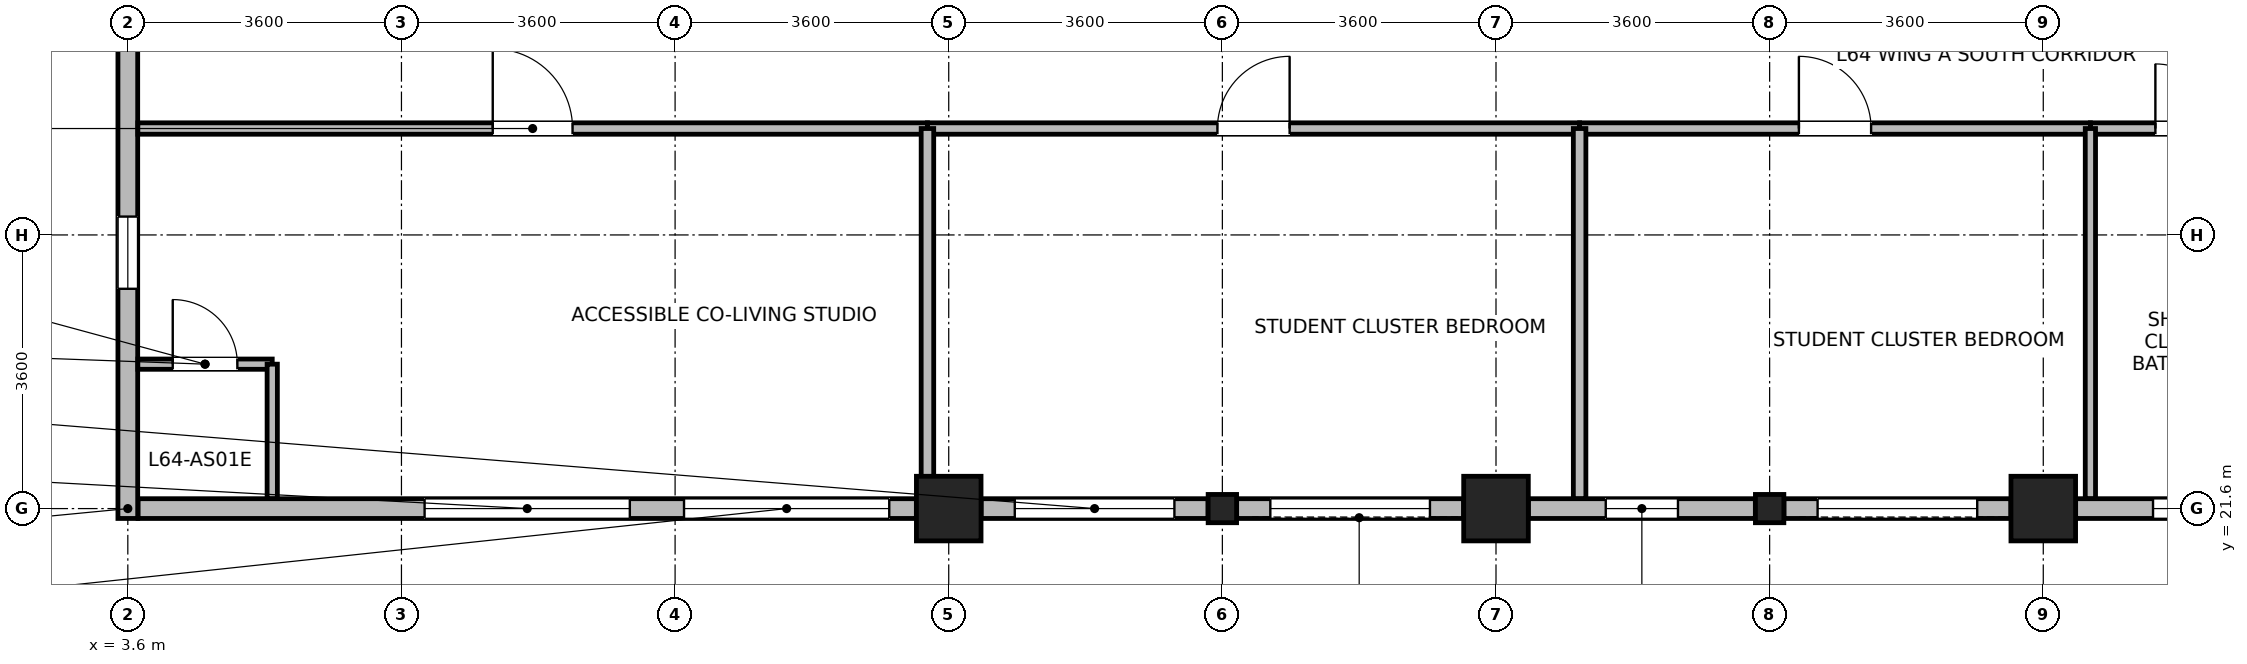
"""IFC4 building model, lengths in metres.
Left out: names, types, materials, properties, quantities, classifications, styles, units other than length and angle.
Written with IfcOpenShell. Run it as: python <this file> out.ifc"""

import sys

from ifc_helpers import new_model, si_unit, direction, frame, frame_2d, origin, origin_2d, place, context, subcontext, project, spatial, rectangle, i_section, extrude, source, transform, mapped, element, fill, save


model = new_model("IFC4")
c1 = context("Model", 3, precision=1e-05, world=origin(), true_north=direction((0.0, 1.0)))
c2 = subcontext(c1, "Body", "Model", "MODEL_VIEW")
j1 = project(units=[si_unit("LENGTHUNIT", "METRE"), si_unit("PLANEANGLEUNIT", "RADIAN")], contexts=[c1])
p1 = place(None, origin())
s1 = spatial("IfcSite", under=j1, at=p1, CompositionType="ELEMENT")
p2 = place(p1, origin())
s2 = spatial("IfcBuilding", under=s1, at=p2, CompositionType="ELEMENT")
p3 = place(p2, frame((0.0, 0.0, 249.9)))
s3 = spatial("IfcBuildingStorey", under=s2, at=p3, CompositionType="ELEMENT", Elevation=249.9)
m1 = source(origin(), c2, "Body", "SweptSolid", [
    extrude(rectangle(XDim=0.85, YDim=0.85, at=origin_2d()), origin(), (0.0, 0.0, 1.0), 3.7),
])
for number, where, z_axis, x_axis in (
    (1, (14.4, 21.6, 0.0), (0.0, 0.0, 1.0), (1.0, 0.0, 0.0)),
    (2, (21.6, 21.6, 0.0), (0.0, 0.0, 1.0), (1.0, 0.0, 0.0)),
    (3, (28.8, 21.6, 0.0), (0.0, 0.0, 1.0), (1.0, 0.0, 0.0)),
):
    element("IfcColumn", number, at=place(p3, frame(where, z_axis=z_axis, x_axis=x_axis)), inside=s3, PredefinedType="COLUMN", context=c2, shape_type="MappedRepresentation", body=[
        mapped(m1, transform((0.0, 0.0, 0.0), x_axis=(1.0, 0.0, 0.0), y_axis=(0.0, 1.0, 0.0), z_axis=(0.0, 0.0, 1.0), scale=1.0)),
    ])
m2 = source(origin(), c2, "Body", "SweptSolid", [
    extrude(i_section(OverallWidth=0.374, OverallDepth=0.372, WebThickness=0.015, FlangeThickness=0.026, FilletRadius=0.015, at=origin_2d()), origin(), (0.0, 0.0, 1.0), 3.7),
])
for number, where, z_axis, x_axis in (
    (4, (18.0, 21.6, 0.0), (0.0, 0.0, 1.0), (1.0, 0.0, 0.0)),
    (5, (25.2, 21.6, 0.0), (0.0, 0.0, 1.0), (1.0, 0.0, 0.0)),
):
    element("IfcColumn", number, at=place(p3, frame(where, z_axis=z_axis, x_axis=x_axis)), inside=s3, PredefinedType="COLUMN", context=c2, shape_type="MappedRepresentation", body=[
        mapped(m2, transform((0.0, 0.0, 0.0), x_axis=(1.0, 0.0, 0.0), y_axis=(0.0, 1.0, 0.0), z_axis=(0.0, 0.0, 1.0), scale=1.0)),
    ])
p4 = place(p3, frame((13.974, 21.6, 0.0), z_axis=(0.0, 0.0, 1.0), x_axis=(-1.0, 0.0, 0.0)))
e6 = element("IfcWall", 6, at=p4, inside=s3, PredefinedType="STANDARD", context=c2, shape_type="SweptSolid", body=[
    extrude(rectangle(XDim=10.239, YDim=0.26, at=frame_2d((5.12, 0.0))), origin(), (0.0, 0.0, 1.0), 3.455),
])
p5 = place(p4, frame((0.356, 0.0, 0.85)))
e7 = element("IfcOpeningElement", 7, at=p5, cuts=e6, PredefinedType="OPENING", context=c2, shape_type="SweptSolid", body=[
    extrude(rectangle(XDim=2.7, YDim=2.05, at=frame_2d((1.35, 1.025))), frame((0.0, 0.14, 0.0), z_axis=(0.0, -1.0, 0.0), x_axis=(1.0, 0.0, 0.0)), (0.0, 0.0, 1.0), 0.28),
])
p6 = place(p4, frame((3.77, 0.0, 0.85)))
e8 = element("IfcOpeningElement", 8, at=p6, cuts=e6, PredefinedType="OPENING", context=c2, shape_type="SweptSolid", body=[
    extrude(rectangle(XDim=2.7, YDim=2.05, at=frame_2d((1.35, 1.025))), frame((0.0, 0.14, 0.0), z_axis=(0.0, -1.0, 0.0), x_axis=(1.0, 0.0, 0.0)), (0.0, 0.0, 1.0), 0.28),
])
p7 = place(p3, frame((17.812, 21.6, 0.0), z_axis=(0.0, 0.0, 1.0), x_axis=(-1.0, 0.0, 0.0)))
e9 = element("IfcWall", 9, at=p7, inside=s3, PredefinedType="STANDARD", context=c2, shape_type="SweptSolid", body=[
    extrude(rectangle(XDim=2.986, YDim=0.26, at=frame_2d((1.493, 0.0))), origin(), (0.0, 0.0, 1.0), 3.055),
])
p8 = place(p7, frame((0.443, 0.0, 0.85)))
e10 = element("IfcOpeningElement", 10, at=p8, cuts=e9, PredefinedType="OPENING", context=c2, shape_type="SweptSolid", body=[
    extrude(rectangle(XDim=2.1, YDim=1.95, at=frame_2d((1.05, 0.975))), frame((0.0, 0.14, 0.0), z_axis=(0.0, -1.0, 0.0), x_axis=(1.0, 0.0, 0.0)), (0.0, 0.0, 1.0), 0.28),
])
p9 = place(p3, frame((21.174, 21.6, 0.0), z_axis=(0.0, 0.0, 1.0), x_axis=(-1.0, 0.0, 0.0)))
e11 = element("IfcWall", 11, at=p9, inside=s3, PredefinedType="STANDARD", context=c2, shape_type="SweptSolid", body=[
    extrude(rectangle(XDim=2.986, YDim=0.26, at=frame_2d((1.493, 0.0))), origin(), (0.0, 0.0, 1.0), 3.055),
])
p10 = place(p9, frame((0.443, 0.0, 0.85)))
e12 = element("IfcOpeningElement", 12, at=p10, cuts=e11, PredefinedType="OPENING", context=c2, shape_type="SweptSolid", body=[
    extrude(rectangle(XDim=2.1, YDim=1.95, at=frame_2d((1.05, 0.975))), frame((0.0, 0.14, 0.0), z_axis=(0.0, -1.0, 0.0), x_axis=(1.0, 0.0, 0.0)), (0.0, 0.0, 1.0), 0.28),
])
p11 = place(p3, frame((25.012, 21.6, 0.0), z_axis=(0.0, 0.0, 1.0), x_axis=(-1.0, 0.0, 0.0)))
e13 = element("IfcWall", 13, at=p11, inside=s3, PredefinedType="STANDARD", context=c2, shape_type="SweptSolid", body=[
    extrude(rectangle(XDim=2.986, YDim=0.26, at=frame_2d((1.493, 0.0))), origin(), (0.0, 0.0, 1.0), 3.055),
])
p12 = place(p11, frame((1.018, 0.0, 0.85)))
e14 = element("IfcOpeningElement", 14, at=p12, cuts=e13, PredefinedType="OPENING", context=c2, shape_type="SweptSolid", body=[
    extrude(rectangle(XDim=0.95, YDim=1.75, at=frame_2d((0.475, 0.875))), frame((0.0, 0.14, 0.0), z_axis=(0.0, -1.0, 0.0), x_axis=(1.0, 0.0, 0.0)), (0.0, 0.0, 1.0), 0.28),
])
p13 = place(p3, frame((28.374, 21.6, 0.0), z_axis=(0.0, 0.0, 1.0), x_axis=(-1.0, 0.0, 0.0)))
e15 = element("IfcWall", 15, at=p13, inside=s3, PredefinedType="STANDARD", context=c2, shape_type="SweptSolid", body=[
    extrude(rectangle(XDim=2.986, YDim=0.26, at=frame_2d((1.493, 0.0))), origin(), (0.0, 0.0, 1.0), 3.055),
])
p14 = place(p13, frame((0.443, 0.0, 0.85)))
e16 = element("IfcOpeningElement", 16, at=p14, cuts=e15, PredefinedType="OPENING", context=c2, shape_type="SweptSolid", body=[
    extrude(rectangle(XDim=2.1, YDim=1.95, at=frame_2d((1.05, 0.975))), frame((0.0, 0.14, 0.0), z_axis=(0.0, -1.0, 0.0), x_axis=(1.0, 0.0, 0.0)), (0.0, 0.0, 1.0), 0.28),
])
p15 = place(p3, frame((32.212, 21.6, 0.0), z_axis=(0.0, 0.0, 1.0), x_axis=(-1.0, 0.0, 0.0)))
e17 = element("IfcWall", 17, at=p15, inside=s3, PredefinedType="STANDARD", context=c2, shape_type="SweptSolid", body=[
    extrude(rectangle(XDim=2.986, YDim=0.26, at=frame_2d((1.493, 0.0))), origin(), (0.0, 0.0, 1.0), 3.055),
])
p16 = place(p15, frame((1.018, 0.0, 0.85)))
e18 = element("IfcOpeningElement", 18, at=p16, cuts=e17, PredefinedType="OPENING", context=c2, shape_type="SweptSolid", body=[
    extrude(rectangle(XDim=0.95, YDim=1.75, at=frame_2d((0.475, 0.875))), frame((0.0, 0.14, 0.0), z_axis=(0.0, -1.0, 0.0), x_axis=(1.0, 0.0, 0.0)), (0.0, 0.0, 1.0), 0.28),
])
p17 = place(p3, frame((3.6, 21.47, 0.0), z_axis=(0.0, 0.0, 1.0), x_axis=(0.0, 1.0, 0.0)))
e19 = element("IfcWall", 19, at=p17, inside=s3, PredefinedType="STANDARD", context=c2, shape_type="SweptSolid", body=[
    extrude(rectangle(XDim=6.993, YDim=0.26, at=frame_2d((3.497, 0.0))), origin(), (0.0, 0.0, 1.0), 3.455),
])
p18 = place(p17, frame((3.021, 0.0, 0.85)))
e20 = element("IfcOpeningElement", 20, at=p18, cuts=e19, PredefinedType="OPENING", context=c2, shape_type="SweptSolid", body=[
    extrude(rectangle(XDim=0.95, YDim=1.75, at=frame_2d((0.475, 0.875))), frame((0.0, 0.14, 0.0), z_axis=(0.0, -1.0, 0.0), x_axis=(1.0, 0.0, 0.0)), (0.0, 0.0, 1.0), 0.28),
])
p19 = place(p3, frame((3.732, 23.5, 0.0), z_axis=(0.0, 0.0, 1.0), x_axis=(1.0, 0.0, 0.0)))
e21 = element("IfcWall", 21, at=p19, inside=s3, PredefinedType="PARTITIONING", context=c2, shape_type="SweptSolid", body=[
    extrude(rectangle(XDim=1.768, YDim=0.135, at=frame_2d((0.884, 0.0))), origin(), (0.0, 0.0, 1.0), 3.455),
])
p20 = place(p19, frame((0.459, 0.0, 0.0)))
e22 = element("IfcOpeningElement", 22, at=p20, cuts=e21, PredefinedType="OPENING", context=c2, shape_type="SweptSolid", body=[
    extrude(rectangle(XDim=0.85, YDim=2.04, at=frame_2d((0.425, 1.02))), frame((0.0, 0.078, 0.0), z_axis=(0.0, -1.0, 0.0), x_axis=(1.0, 0.0, 0.0)), (0.0, 0.0, 1.0), 0.155),
])
p21 = place(p3, frame((5.5, 21.732, 0.0), z_axis=(0.0, 0.0, 1.0), x_axis=(0.0, 1.0, 0.0)))
e23 = element("IfcWall", 23, at=p21, inside=s3, PredefinedType="PARTITIONING", context=c2, shape_type="SweptSolid", body=[
    extrude(rectangle(XDim=1.768, YDim=0.135, at=frame_2d((0.884, 0.0))), origin(), (0.0, 0.0, 1.0), 3.455),
])
p22 = place(p3, frame((3.732, 26.6, 0.0), z_axis=(0.0, 0.0, 1.0), x_axis=(1.0, 0.0, 0.0)))
e24 = element("IfcWall", 24, at=p22, inside=s3, PredefinedType="PARTITIONING", context=c2, shape_type="SweptSolid", body=[
    extrude(rectangle(XDim=10.388, YDim=0.15, at=frame_2d((5.194, 0.0))), origin(), (0.0, 0.0, 1.0), 3.455),
])
p23 = place(p22, frame((4.669, 0.0, 0.0)))
e25 = element("IfcOpeningElement", 25, at=p23, cuts=e24, PredefinedType="OPENING", context=c2, shape_type="SweptSolid", body=[
    extrude(rectangle(XDim=1.05, YDim=2.12, at=frame_2d((0.525, 1.06))), frame((0.0, 0.085, 0.0), z_axis=(0.0, -1.0, 0.0), x_axis=(1.0, 0.0, 0.0)), (0.0, 0.0, 1.0), 0.17),
])
p24 = place(p3, frame((14.12, 26.6, 0.0), z_axis=(0.0, 0.0, 1.0), x_axis=(1.0, 0.0, 0.0)))
e26 = element("IfcWall", 26, at=p24, inside=s3, PredefinedType="PARTITIONING", context=c2, shape_type="SweptSolid", body=[
    extrude(rectangle(XDim=8.58, YDim=0.15, at=frame_2d((4.29, 0.0))), origin(), (0.0, 0.0, 1.0), 3.455),
])
p25 = place(p24, frame((3.815, 0.0, 0.0)))
e27 = element("IfcOpeningElement", 27, at=p25, cuts=e26, PredefinedType="OPENING", context=c2, shape_type="SweptSolid", body=[
    extrude(rectangle(XDim=0.95, YDim=2.1, at=frame_2d((0.475, 1.05))), frame((0.0, 0.085, 0.0), z_axis=(0.0, -1.0, 0.0), x_axis=(1.0, 0.0, 0.0)), (0.0, 0.0, 1.0), 0.17),
])
p26 = place(p3, frame((22.7, 26.6, 0.0), z_axis=(0.0, 0.0, 1.0), x_axis=(1.0, 0.0, 0.0)))
e28 = element("IfcWall", 28, at=p26, inside=s3, PredefinedType="PARTITIONING", context=c2, shape_type="SweptSolid", body=[
    extrude(rectangle(XDim=6.72, YDim=0.15, at=frame_2d((3.36, 0.0))), origin(), (0.0, 0.0, 1.0), 3.455),
])
p27 = place(p26, frame((2.885, 0.0, 0.0)))
e29 = element("IfcOpeningElement", 29, at=p27, cuts=e28, PredefinedType="OPENING", context=c2, shape_type="SweptSolid", body=[
    extrude(rectangle(XDim=0.95, YDim=2.1, at=frame_2d((0.475, 1.05))), frame((0.0, 0.085, 0.0), z_axis=(0.0, -1.0, 0.0), x_axis=(1.0, 0.0, 0.0)), (0.0, 0.0, 1.0), 0.17),
])
p28 = place(p3, frame((29.42, 26.6, 0.0), z_axis=(0.0, 0.0, 1.0), x_axis=(1.0, 0.0, 0.0)))
e30 = element("IfcWall", 30, at=p28, inside=s3, PredefinedType="PARTITIONING", context=c2, shape_type="SweptSolid", body=[
    extrude(rectangle(XDim=2.56, YDim=0.15, at=frame_2d((1.28, 0.0))), origin(), (0.0, 0.0, 1.0), 3.455),
])
p29 = place(p28, frame((0.855, 0.0, 0.0)))
e31 = element("IfcOpeningElement", 31, at=p29, cuts=e30, PredefinedType="OPENING", context=c2, shape_type="SweptSolid", body=[
    extrude(rectangle(XDim=0.85, YDim=2.04, at=frame_2d((0.425, 1.02))), frame((0.0, 0.085, 0.0), z_axis=(0.0, -1.0, 0.0), x_axis=(1.0, 0.0, 0.0)), (0.0, 0.0, 1.0), 0.17),
])
for number, where, z_axis, x_axis in (
    (32, (14.12, 21.732, 0.0), (0.0, 0.0, 1.0), (0.0, 1.0, 0.0)),
    (33, (22.7, 21.732, 0.0), (0.0, 0.0, 1.0), (0.0, 1.0, 0.0)),
):
    element("IfcWall", number, at=place(p3, frame(where, z_axis=z_axis, x_axis=x_axis)), inside=s3, PredefinedType="PARTITIONING", context=c2, shape_type="SweptSolid", body=[
        extrude(rectangle(XDim=4.868, YDim=0.165, at=frame_2d((2.434, 0.0))), origin(), (0.0, 0.0, 1.0), 3.455),
    ])
p30 = place(p3, frame((29.42, 21.732, 0.0), z_axis=(0.0, 0.0, 1.0), x_axis=(0.0, 1.0, 0.0)))
e34 = element("IfcWall", 34, at=p30, inside=s3, PredefinedType="PARTITIONING", context=c2, shape_type="SweptSolid", body=[
    extrude(rectangle(XDim=4.868, YDim=0.135, at=frame_2d((2.434, 0.0))), origin(), (0.0, 0.0, 1.0), 3.455),
])
p31 = place(p5, origin())
e35 = element("IfcWindow", 35, at=p31, inside=s3, PartitioningType="SINGLE_PANEL", PredefinedType="WINDOW", context=c2, shape_type="SweptSolid", body=[
    extrude(rectangle(XDim=2.7, YDim=2.05, at=frame_2d((1.35, 1.025))), frame((0.0, 0.03, 0.0), z_axis=(0.0, -1.0, 0.0), x_axis=(1.0, 0.0, 0.0)), (0.0, 0.0, 1.0), 0.06),
])
fill(e7, e35)
p32 = place(p6, origin())
e36 = element("IfcWindow", 36, at=p32, inside=s3, PartitioningType="SINGLE_PANEL", PredefinedType="WINDOW", context=c2, shape_type="SweptSolid", body=[
    extrude(rectangle(XDim=2.7, YDim=2.05, at=frame_2d((1.35, 1.025))), frame((0.0, 0.03, 0.0), z_axis=(0.0, -1.0, 0.0), x_axis=(1.0, 0.0, 0.0)), (0.0, 0.0, 1.0), 0.06),
])
fill(e8, e36)
p33 = place(p8, origin())
e37 = element("IfcWindow", 37, at=p33, inside=s3, PartitioningType="SINGLE_PANEL", PredefinedType="WINDOW", context=c2, shape_type="SweptSolid", body=[
    extrude(rectangle(XDim=2.1, YDim=1.95, at=frame_2d((1.05, 0.975))), frame((0.0, 0.03, 0.0), z_axis=(0.0, -1.0, 0.0), x_axis=(1.0, 0.0, 0.0)), (0.0, 0.0, 1.0), 0.06),
])
fill(e10, e37)
p34 = place(p10, origin())
e38 = element("IfcWindow", 38, at=p34, inside=s3, PartitioningType="SINGLE_PANEL", PredefinedType="WINDOW", context=c2, shape_type="SweptSolid", body=[
    extrude(rectangle(XDim=2.1, YDim=1.95, at=frame_2d((1.05, 0.975))), frame((0.0, 0.03, 0.0), z_axis=(0.0, -1.0, 0.0), x_axis=(1.0, 0.0, 0.0)), (0.0, 0.0, 1.0), 0.06),
])
fill(e12, e38)
p35 = place(p12, origin())
e39 = element("IfcWindow", 39, at=p35, inside=s3, PartitioningType="SINGLE_PANEL", PredefinedType="WINDOW", context=c2, shape_type="SweptSolid", body=[
    extrude(rectangle(XDim=0.95, YDim=1.75, at=frame_2d((0.475, 0.875))), frame((0.0, 0.03, 0.0), z_axis=(0.0, -1.0, 0.0), x_axis=(1.0, 0.0, 0.0)), (0.0, 0.0, 1.0), 0.06),
])
fill(e14, e39)
p36 = place(p14, origin())
e40 = element("IfcWindow", 40, at=p36, inside=s3, PartitioningType="SINGLE_PANEL", PredefinedType="WINDOW", context=c2, shape_type="SweptSolid", body=[
    extrude(rectangle(XDim=2.1, YDim=1.95, at=frame_2d((1.05, 0.975))), frame((0.0, 0.03, 0.0), z_axis=(0.0, -1.0, 0.0), x_axis=(1.0, 0.0, 0.0)), (0.0, 0.0, 1.0), 0.06),
])
fill(e16, e40)
p37 = place(p16, origin())
e41 = element("IfcWindow", 41, at=p37, inside=s3, PartitioningType="SINGLE_PANEL", PredefinedType="WINDOW", context=c2, shape_type="SweptSolid", body=[
    extrude(rectangle(XDim=0.95, YDim=1.75, at=frame_2d((0.475, 0.875))), frame((0.0, 0.03, 0.0), z_axis=(0.0, -1.0, 0.0), x_axis=(1.0, 0.0, 0.0)), (0.0, 0.0, 1.0), 0.06),
])
fill(e18, e41)
p38 = place(p18, origin())
e42 = element("IfcWindow", 42, at=p38, inside=s3, PartitioningType="SINGLE_PANEL", PredefinedType="WINDOW", context=c2, shape_type="SweptSolid", body=[
    extrude(rectangle(XDim=0.95, YDim=1.75, at=frame_2d((0.475, 0.875))), frame((0.0, 0.03, 0.0), z_axis=(0.0, -1.0, 0.0), x_axis=(1.0, 0.0, 0.0)), (0.0, 0.0, 1.0), 0.06),
])
fill(e20, e42)
p39 = place(p20, origin())
e43 = element("IfcDoor", 43, at=p39, inside=s3, OperationType="SINGLE_SWING_LEFT", PredefinedType="DOOR", context=c2, shape_type="SweptSolid", body=[
    extrude(rectangle(XDim=0.85, YDim=2.04, at=frame_2d((0.425, 1.02))), frame((0.0, 0.025, 0.0), z_axis=(0.0, -1.0, 0.0), x_axis=(1.0, 0.0, 0.0)), (0.0, 0.0, 1.0), 0.05),
])
fill(e22, e43)
p40 = place(p23, origin())
e44 = element("IfcDoor", 44, at=p40, inside=s3, OperationType="SINGLE_SWING_LEFT", PredefinedType="DOOR", context=c2, shape_type="SweptSolid", body=[
    extrude(rectangle(XDim=1.05, YDim=2.12, at=frame_2d((0.525, 1.06))), frame((0.0, 0.025, 0.0), z_axis=(0.0, -1.0, 0.0), x_axis=(1.0, 0.0, 0.0)), (0.0, 0.0, 1.0), 0.05),
])
fill(e25, e44)
p41 = place(p25, origin())
e45 = element("IfcDoor", 45, at=p41, inside=s3, OperationType="SINGLE_SWING_RIGHT", PredefinedType="DOOR", context=c2, shape_type="SweptSolid", body=[
    extrude(rectangle(XDim=0.95, YDim=2.1, at=frame_2d((0.475, 1.05))), frame((0.0, 0.025, 0.0), z_axis=(0.0, -1.0, 0.0), x_axis=(1.0, 0.0, 0.0)), (0.0, 0.0, 1.0), 0.05),
])
fill(e27, e45)
p42 = place(p27, origin())
e46 = element("IfcDoor", 46, at=p42, inside=s3, OperationType="SINGLE_SWING_LEFT", PredefinedType="DOOR", context=c2, shape_type="SweptSolid", body=[
    extrude(rectangle(XDim=0.95, YDim=2.1, at=frame_2d((0.475, 1.05))), frame((0.0, 0.025, 0.0), z_axis=(0.0, -1.0, 0.0), x_axis=(1.0, 0.0, 0.0)), (0.0, 0.0, 1.0), 0.05),
])
fill(e29, e46)
p43 = place(p29, origin())
e47 = element("IfcDoor", 47, at=p43, inside=s3, OperationType="SINGLE_SWING_LEFT", PredefinedType="DOOR", context=c2, shape_type="SweptSolid", body=[
    extrude(rectangle(XDim=0.85, YDim=2.04, at=frame_2d((0.425, 1.02))), frame((0.0, 0.025, 0.0), z_axis=(0.0, -1.0, 0.0), x_axis=(1.0, 0.0, 0.0)), (0.0, 0.0, 1.0), 0.05),
])
fill(e31, e47)
save(model, sys.argv[1])
